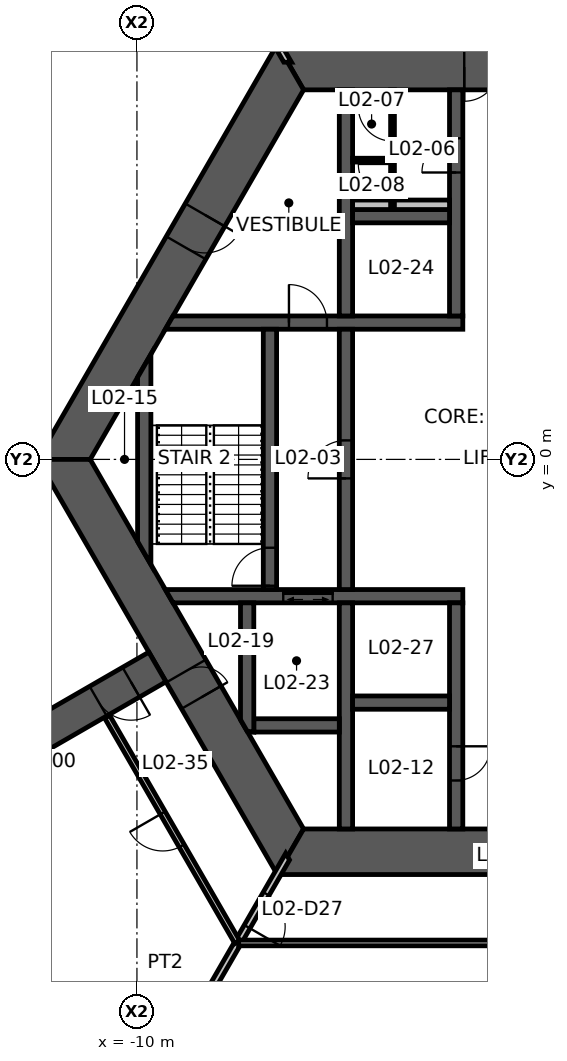
"""IFC4 building model, lengths in metres.
Left out: names, types, materials, properties, quantities, classifications, styles, units other than length and angle.
Written with IfcOpenShell. Run it as: python <this file> out.ifc"""

import sys

from ifc_helpers import new_model, si_unit, direction, frame, frame_2d, origin, place, context, subcontext, project, spatial, polyline, rectangle, outline, extrude, element, fill, save


model = new_model("IFC4")
c1 = context("Model", 3, precision=1e-05, world=origin(), true_north=direction((0.0, 1.0)))
c2 = subcontext(c1, "Body", "Model", "MODEL_VIEW")
j1 = project(units=[si_unit("LENGTHUNIT", "METRE"), si_unit("PLANEANGLEUNIT", "RADIAN")], contexts=[c1])
p1 = place(None, origin())
s1 = spatial("IfcSite", under=j1, at=p1, CompositionType="ELEMENT")
p2 = place(p1, origin())
s2 = spatial("IfcBuilding", under=s1, at=p2, CompositionType="ELEMENT")
p3 = place(p2, frame((0.0, 0.0, 5.5)))
s3 = spatial("IfcBuildingStorey", under=s2, at=p3, CompositionType="ELEMENT", Elevation=5.5)
p4 = place(p3, frame((5.961, 10.325, 0.0), z_axis=(0.0, 0.0, 1.0), x_axis=(-1.0, 0.0, 0.0)))
e1 = element("IfcWall", 1, at=p4, inside=s3, PredefinedType="SHEAR", context=c2, shape_type="SweptSolid", body=[
    extrude(outline(polyline([(-0.346, -0.6), (4.574, -0.6), (5.474, -0.6), (6.449, -0.6), (7.349, -0.6), (12.269, -0.6), (11.576, 0.6), (7.349, 0.6), (6.449, 0.6), (5.474, 0.6), (4.574, 0.6), (0.346, 0.6), (-0.346, -0.6)])), origin(), (0.0, 0.0, 1.0), 4.5),
])
p5 = place(p4, frame((6.449, 0.0, 0.0)))
e2 = element("IfcOpeningElement", 2, at=p5, cuts=e1, PredefinedType="OPENING", context=c2, shape_type="SweptSolid", body=[
    extrude(rectangle(XDim=0.9, YDim=2.1, at=frame_2d((0.45, 1.05))), frame((0.0, 0.61, 0.0), z_axis=(0.0, -1.0, 0.0), x_axis=(1.0, 0.0, 0.0)), (0.0, 0.0, 1.0), 1.22),
])
p6 = place(p4, frame((4.574, 0.0, 0.0)))
e3 = element("IfcOpeningElement", 3, at=p6, cuts=e1, PredefinedType="OPENING", context=c2, shape_type="SweptSolid", body=[
    extrude(rectangle(XDim=0.9, YDim=2.1, at=frame_2d((0.45, 1.05))), frame((0.0, 0.61, 0.0), z_axis=(0.0, -1.0, 0.0), x_axis=(1.0, 0.0, 0.0)), (0.0, 0.0, 1.0), 1.22),
])
p7 = place(p3, frame((-5.961, 10.325, 0.0), z_axis=(0.0, 0.0, 1.0), x_axis=(-0.500004296715, -0.866022923061, 0.0)))
e4 = element("IfcWall", 4, at=p7, inside=s3, PredefinedType="SHEAR", context=c2, shape_type="SweptSolid", body=[
    extrude(outline(polyline([(-0.346, -0.6), (4.494, -0.6), (5.494, -0.6), (12.269, -0.6), (11.576, 0.6), (5.494, 0.6), (4.494, 0.6), (0.346, 0.6), (-0.346, -0.6)])), origin(), (0.0, 0.0, 1.0), 4.5),
])
p8 = place(p7, frame((4.494, 0.0, 0.0)))
e5 = element("IfcOpeningElement", 5, at=p8, cuts=e4, PredefinedType="OPENING", context=c2, shape_type="SweptSolid", body=[
    extrude(rectangle(XDim=1.0, YDim=2.1, at=frame_2d((0.5, 1.05))), frame((0.0, 0.61, 0.0), z_axis=(0.0, -1.0, 0.0), x_axis=(1.0, 0.0, 0.0)), (0.0, 0.0, 1.0), 1.22),
])
p9 = place(p3, frame((-11.922, 0.0, 0.0), z_axis=(0.0, 0.0, 1.0), x_axis=(0.500004296715, -0.866022923061, 0.0)))
e6 = element("IfcWall", 6, at=p9, inside=s3, PredefinedType="SHEAR", context=c2, shape_type="SweptSolid", body=[
    extrude(outline(polyline([(-0.346, -0.6), (6.431, -0.6), (7.231, -0.6), (12.269, -0.6), (11.576, 0.6), (7.231, 0.6), (6.431, 0.6), (0.346, 0.6), (-0.346, -0.6)])), origin(), (0.0, 0.0, 1.0), 4.5),
])
p10 = place(p9, frame((6.431, 0.0, 0.0)))
e7 = element("IfcOpeningElement", 7, at=p10, cuts=e6, PredefinedType="OPENING", context=c2, shape_type="SweptSolid", body=[
    extrude(rectangle(XDim=0.8, YDim=2.1, at=frame_2d((0.4, 1.05))), frame((0.0, 0.61, 0.0), z_axis=(0.0, -1.0, 0.0), x_axis=(1.0, 0.0, 0.0)), (0.0, 0.0, 1.0), 1.22),
])
p11 = place(p3, frame((-5.961, -10.325, 0.0), z_axis=(0.0, 0.0, 1.0), x_axis=(1.0, 0.0, 0.0)))
e8 = element("IfcWall", 8, at=p11, inside=s3, PredefinedType="SHEAR", context=c2, shape_type="SweptSolid", body=[
    extrude(outline(polyline([(-0.346, -0.6), (5.461, -0.6), (6.461, -0.6), (12.269, -0.6), (11.576, 0.6), (6.461, 0.6), (5.461, 0.6), (0.346, 0.6), (-0.346, -0.6)])), origin(), (0.0, 0.0, 1.0), 4.5),
])
p12 = place(p11, frame((5.461, 0.0, 0.0)))
e9 = element("IfcOpeningElement", 9, at=p12, cuts=e8, PredefinedType="OPENING", context=c2, shape_type="SweptSolid", body=[
    extrude(rectangle(XDim=1.0, YDim=2.1, at=frame_2d((0.5, 1.05))), frame((0.0, 0.61, 0.0), z_axis=(0.0, -1.0, 0.0), x_axis=(1.0, 0.0, 0.0)), (0.0, 0.0, 1.0), 1.22),
])
p13 = place(p3, frame((-9.461, -5.462, 0.0), z_axis=(0.0, 0.0, 1.0), x_axis=(-0.866019116917, -0.500010889016, 0.0)))
e10 = element("IfcWall", 10, at=p13, inside=s3, PredefinedType="SHEAR", context=c2, shape_type="SweptSolid", body=[
    extrude(rectangle(XDim=7.595, YDim=0.9, at=frame_2d((3.798, 0.0))), origin(), (0.0, 0.0, 1.0), 4.5),
])
p14 = place(p13, frame((0.8, 0.0, 0.0)))
e11 = element("IfcOpeningElement", 11, at=p14, cuts=e10, PredefinedType="OPENING", context=c2, shape_type="SweptSolid", body=[
    extrude(rectangle(XDim=1.0, YDim=2.1, at=frame_2d((0.5, 1.05))), frame((0.0, 0.46, 0.0), z_axis=(0.0, -1.0, 0.0), x_axis=(1.0, 0.0, 0.0)), (0.0, 0.0, 1.0), 0.92),
])
p15 = place(p3, frame((-9.151, 3.6, 0.0), z_axis=(0.0, 0.0, 1.0), x_axis=(1.0, 0.0, 0.0)))
e12 = element("IfcWall", 12, at=p15, inside=s3, PredefinedType="SHEAR", context=c2, shape_type="SweptSolid", body=[
    extrude(outline(polyline([(-0.101, -0.175), (3.151, -0.175), (4.151, -0.175), (7.726, -0.175), (7.726, 0.175), (4.151, 0.175), (3.151, 0.175), (0.101, 0.175), (-0.101, -0.175)])), origin(), (0.0, 0.0, 1.0), 4.5),
])
p16 = place(p15, frame((3.151, 0.0, 0.0)))
e13 = element("IfcOpeningElement", 13, at=p16, cuts=e12, PredefinedType="OPENING", context=c2, shape_type="SweptSolid", body=[
    extrude(rectangle(XDim=1.0, YDim=2.1, at=frame_2d((0.5, 1.05))), frame((0.0, 0.185, 0.0), z_axis=(0.0, -1.0, 0.0), x_axis=(1.0, 0.0, 0.0)), (0.0, 0.0, 1.0), 0.37),
])
p17 = place(p3, frame((-9.151, -3.6, 0.0), z_axis=(0.0, 0.0, 1.0), x_axis=(1.0, 0.0, 0.0)))
e14 = element("IfcWall", 14, at=p17, inside=s3, PredefinedType="SHEAR", context=c2, shape_type="SweptSolid", body=[
    extrude(outline(polyline([(0.101, -0.175), (3.001, -0.175), (4.301, -0.175), (7.726, -0.175), (7.726, 0.175), (4.301, 0.175), (3.001, 0.175), (-0.101, 0.175), (0.101, -0.175)])), origin(), (0.0, 0.0, 1.0), 4.5),
])
p18 = place(p17, frame((3.001, 0.0, 0.0)))
e15 = element("IfcOpeningElement", 15, at=p18, cuts=e14, PredefinedType="OPENING", context=c2, shape_type="SweptSolid", body=[
    extrude(rectangle(XDim=1.3, YDim=2.1, at=frame_2d((0.65, 1.05))), frame((0.0, 0.185, 0.0), z_axis=(0.0, -1.0, 0.0), x_axis=(1.0, 0.0, 0.0)), (0.0, 0.0, 1.0), 0.37),
])
p19 = place(p3, frame((-1.6, 3.775, 0.0), z_axis=(0.0, 0.0, 1.0), x_axis=(0.0, 1.0, 0.0)))
e16 = element("IfcWall", 16, at=p19, inside=s3, PredefinedType="SHEAR", context=c2, shape_type="SweptSolid", body=[
    extrude(rectangle(XDim=5.95, YDim=0.35, at=frame_2d((2.975, 0.0))), origin(), (0.0, 0.0, 1.0), 4.5),
])
p20 = place(p19, frame((3.775, 0.0, 0.0)))
e17 = element("IfcOpeningElement", 17, at=p20, cuts=e16, PredefinedType="OPENING", context=c2, shape_type="SweptSolid", body=[
    extrude(rectangle(XDim=0.9, YDim=2.1, at=frame_2d((0.45, 1.05))), frame((0.0, 0.185, 0.0), z_axis=(0.0, -1.0, 0.0), x_axis=(1.0, 0.0, 0.0)), (0.0, 0.0, 1.0), 0.37),
])
p21 = place(p3, frame((-1.6, -3.775, 0.0), z_axis=(0.0, 0.0, 1.0), x_axis=(0.0, -1.0, 0.0)))
e18 = element("IfcWall", 18, at=p21, inside=s3, PredefinedType="SHEAR", context=c2, shape_type="SweptSolid", body=[
    extrude(rectangle(XDim=5.95, YDim=0.35, at=frame_2d((2.975, 0.0))), origin(), (0.0, 0.0, 1.0), 4.5),
])
p22 = place(p21, frame((3.775, 0.0, 0.0)))
e19 = element("IfcOpeningElement", 19, at=p22, cuts=e18, PredefinedType="OPENING", context=c2, shape_type="SweptSolid", body=[
    extrude(rectangle(XDim=0.9, YDim=2.1, at=frame_2d((0.45, 1.05))), frame((0.0, 0.185, 0.0), z_axis=(0.0, -1.0, 0.0), x_axis=(1.0, 0.0, 0.0)), (0.0, 0.0, 1.0), 0.37),
])
p23 = place(p3, frame((-4.5, -3.425, 0.0), z_axis=(0.0, 0.0, 1.0), x_axis=(0.0, 1.0, 0.0)))
e20 = element("IfcWall", 20, at=p23, inside=s3, PredefinedType="SHEAR", context=c2, shape_type="SweptSolid", body=[
    extrude(rectangle(XDim=6.85, YDim=0.35, at=frame_2d((3.425, 0.0))), origin(), (0.0, 0.0, 1.0), 4.5),
])
p24 = place(p23, frame((2.925, 0.0, 0.0)))
e21 = element("IfcOpeningElement", 21, at=p24, cuts=e20, PredefinedType="OPENING", context=c2, shape_type="SweptSolid", body=[
    extrude(rectangle(XDim=1.0, YDim=2.1, at=frame_2d((0.5, 1.05))), frame((0.0, 0.185, 0.0), z_axis=(0.0, -1.0, 0.0), x_axis=(1.0, 0.0, 0.0)), (0.0, 0.0, 1.0), 0.37),
])
p25 = place(p3, frame((-6.5, -3.425, 0.0), z_axis=(0.0, 0.0, 1.0), x_axis=(0.0, 1.0, 0.0)))
e22 = element("IfcWall", 22, at=p25, inside=s3, PredefinedType="SHEAR", context=c2, shape_type="SweptSolid", body=[
    extrude(rectangle(XDim=6.85, YDim=0.35, at=frame_2d((3.425, 0.0))), origin(), (0.0, 0.0, 1.0), 4.5),
])
p26 = place(p25, frame((0.1, 0.0, 0.0)))
e23 = element("IfcOpeningElement", 23, at=p26, cuts=e22, PredefinedType="OPENING", context=c2, shape_type="SweptSolid", body=[
    extrude(rectangle(XDim=1.0, YDim=2.1, at=frame_2d((0.5, 1.05))), frame((0.0, 0.185, 0.0), z_axis=(0.0, -1.0, 0.0), x_axis=(1.0, 0.0, 0.0)), (0.0, 0.0, 1.0), 0.37),
])
for number, where, z_axis, x_axis in (
    (24, (-4.5, 3.775, 0.0), (0.0, 0.0, 1.0), (0.0, 1.0, 0.0)),
    (25, (-4.5, -3.775, 0.0), (0.0, 0.0, 1.0), (0.0, -1.0, 0.0)),
):
    element("IfcWall", number, at=place(p3, frame(where, z_axis=z_axis, x_axis=x_axis)), inside=s3, PredefinedType="SHEAR", context=c2, shape_type="SweptSolid", body=[
        extrude(rectangle(XDim=5.95, YDim=0.35, at=frame_2d((2.975, 0.0))), origin(), (0.0, 0.0, 1.0), 4.5),
    ])
for number, where, z_axis, x_axis in (
    (26, (-4.325, 6.4, 0.0), (0.0, 0.0, 1.0), (1.0, 0.0, 0.0)),
    (27, (-4.325, -6.4, 0.0), (0.0, 0.0, 1.0), (1.0, 0.0, 0.0)),
):
    element("IfcWall", number, at=place(p3, frame(where, z_axis=z_axis, x_axis=x_axis)), inside=s3, PredefinedType="SHEAR", context=c2, shape_type="SweptSolid", body=[
        extrude(rectangle(XDim=2.55, YDim=0.35, at=frame_2d((1.275, 0.0))), origin(), (0.0, 0.0, 1.0), 4.5),
    ])
p27 = place(p3, frame((-6.925, -7.0, 0.0), z_axis=(0.0, 0.0, 1.0), x_axis=(1.0, 0.0, 0.0)))
e28 = element("IfcWall", 28, at=p27, inside=s3, PredefinedType="SHEAR", context=c2, shape_type="SweptSolid", body=[
    extrude(rectangle(XDim=2.25, YDim=0.35, at=frame_2d((1.125, 0.0))), origin(), (0.0, 0.0, 1.0), 4.5),
])
p28 = place(p3, frame((-7.1, -3.775, 0.0), z_axis=(0.0, 0.0, 1.0), x_axis=(0.0, -1.0, 0.0)))
e29 = element("IfcWall", 29, at=p28, inside=s3, PredefinedType="SHEAR", context=c2, shape_type="SweptSolid", body=[
    extrude(outline(polyline([(0.0, -0.175), (3.074, -0.175), (3.377, 0.0), (3.4, 0.175), (0.0, 0.175), (0.0, -0.175)])), origin(), (0.0, 0.0, 1.0), 4.5),
])
p29 = place(p3, frame((-9.808, -2.462, 0.0), z_axis=(0.0, 0.0, 1.0), x_axis=(0.0, 1.0, 0.0)))
e30 = element("IfcWall", 30, at=p29, inside=s3, PredefinedType="SHEAR", context=c2, shape_type="SweptSolid", body=[
    extrude(outline(polyline([(-0.303, -0.175), (5.228, -0.175), (4.621, 0.175), (0.303, 0.175), (-0.303, -0.175)])), origin(), (0.0, 0.0, 1.0), 4.5),
])
p30 = place(p3, frame((-4.325, 6.7, 0.0), z_axis=(0.0, 0.0, 1.0), x_axis=(1.0, 0.0, 0.0)))
e31 = element("IfcWall", 31, at=p30, inside=s3, PredefinedType="PLUMBINGWALL", context=c2, shape_type="SweptSolid", body=[
    extrude(rectangle(XDim=2.55, YDim=0.25, at=frame_2d((1.275, 0.0))), origin(), (0.0, 0.0, 1.0), 4.5),
])
p31 = place(p3, frame((-3.275, 6.575, 0.0), z_axis=(0.0, 0.0, 1.0), x_axis=(0.0, 1.0, 0.0)))
e32 = element("IfcWall", 32, at=p31, inside=s3, PredefinedType="PARTITIONING", context=c2, shape_type="SweptSolid", body=[
    extrude(rectangle(XDim=3.15, YDim=0.1, at=frame_2d((1.575, 0.0))), origin(), (0.0, 0.0, 1.0), 3.5),
])
p32 = place(p31, frame((1.8, 0.0, 0.0)))
e33 = element("IfcOpeningElement", 33, at=p32, cuts=e32, PredefinedType="OPENING", context=c2, shape_type="SweptSolid", body=[
    extrude(rectangle(XDim=0.9, YDim=2.1, at=frame_2d((0.45, 1.05))), frame((0.0, 0.06, 0.0), z_axis=(0.0, -1.0, 0.0), x_axis=(1.0, 0.0, 0.0)), (0.0, 0.0, 1.0), 0.12),
])
p33 = place(p31, frame((0.3, 0.0, 0.0)))
e34 = element("IfcOpeningElement", 34, at=p33, cuts=e32, PredefinedType="OPENING", context=c2, shape_type="SweptSolid", body=[
    extrude(rectangle(XDim=0.9, YDim=2.1, at=frame_2d((0.45, 1.05))), frame((0.0, 0.06, 0.0), z_axis=(0.0, -1.0, 0.0), x_axis=(1.0, 0.0, 0.0)), (0.0, 0.0, 1.0), 0.12),
])
p34 = place(p3, frame((-3.325, 7.875, 0.0), z_axis=(0.0, 0.0, 1.0), x_axis=(-1.0, 0.0, 0.0)))
e35 = element("IfcWall", 35, at=p34, inside=s3, PredefinedType="PARTITIONING", context=c2, shape_type="SweptSolid", body=[
    extrude(rectangle(XDim=1.0, YDim=0.1, at=frame_2d((0.5, 0.0))), origin(), (0.0, 0.0, 1.0), 3.5),
])
p35 = place(p3, frame((-6.035, 10.453, 0.0), z_axis=(0.0, 0.0, 1.0), x_axis=(-0.499993402427, 0.866029212861, 0.0)))
e36 = element("IfcWall", 36, at=p35, inside=s3, PredefinedType="PARTITIONING", context=c2, shape_type="SweptSolid", body=[
    extrude(outline(polyline([(-0.051, -0.087), (1.129, -0.087), (2.129, -0.087), (7.93, -0.087), (7.93, 0.087), (2.129, 0.087), (1.129, 0.087), (0.051, 0.087), (-0.051, -0.087)])), origin(), (0.0, 0.0, 1.0), 3.6),
])
p36 = place(p35, frame((1.129, 0.0, 0.0)))
e37 = element("IfcOpeningElement", 37, at=p36, cuts=e36, PredefinedType="OPENING", context=c2, shape_type="SweptSolid", body=[
    extrude(rectangle(XDim=1.0, YDim=2.1, at=frame_2d((0.5, 1.05))), frame((0.0, 0.098, 0.0), z_axis=(0.0, -1.0, 0.0), x_axis=(1.0, 0.0, 0.0)), (0.0, 0.0, 1.0), 0.195),
])
p37 = place(p3, frame((-6.035, -10.453, 0.0), z_axis=(0.0, 0.0, 1.0), x_axis=(-0.499993402427, -0.866029212861, 0.0)))
e38 = element("IfcWall", 38, at=p37, inside=s3, PredefinedType="PARTITIONING", context=c2, shape_type="SweptSolid", body=[
    extrude(outline(polyline([(-0.051, -0.087), (1.129, -0.087), (2.129, -0.087), (7.93, -0.087), (7.93, 0.087), (2.129, 0.087), (1.129, 0.087), (0.051, 0.087), (-0.051, -0.087)])), origin(), (0.0, 0.0, 1.0), 3.6),
])
p38 = place(p37, frame((1.129, 0.0, 0.0)))
e39 = element("IfcOpeningElement", 39, at=p38, cuts=e38, PredefinedType="OPENING", context=c2, shape_type="SweptSolid", body=[
    extrude(rectangle(XDim=1.0, YDim=2.1, at=frame_2d((0.5, 1.05))), frame((0.0, 0.098, 0.0), z_axis=(0.0, -1.0, 0.0), x_axis=(1.0, 0.0, 0.0)), (0.0, 0.0, 1.0), 0.195),
])
p39 = place(p3, frame((-7.358, -12.705, 0.0), z_axis=(0.0, 0.0, 1.0), x_axis=(-0.499985579985, 0.866033729024, 0.0)))
e40 = element("IfcWall", 40, at=p39, inside=s3, PredefinedType="PARTITIONING", context=c2, shape_type="SweptSolid", body=[
    extrude(rectangle(XDim=6.854, YDim=0.15, at=frame_2d((3.427, 0.0))), origin(), (0.0, 0.0, 1.0), 3.5),
])
p40 = place(p39, frame((2.927, 0.0, 0.0)))
e41 = element("IfcOpeningElement", 41, at=p40, cuts=e40, PredefinedType="OPENING", context=c2, shape_type="SweptSolid", body=[
    extrude(rectangle(XDim=1.0, YDim=2.1, at=frame_2d((0.5, 1.05))), frame((0.0, 0.085, 0.0), z_axis=(0.0, -1.0, 0.0), x_axis=(1.0, 0.0, 0.0)), (0.0, 0.0, 1.0), 0.17),
])
p41 = place(p3, frame((7.347, -12.725, 0.0), z_axis=(0.0, 0.0, 1.0), x_axis=(-1.0, 0.0, 0.0)))
e42 = element("IfcWall", 42, at=p41, inside=s3, PredefinedType="PARTITIONING", context=c2, shape_type="SweptSolid", body=[
    extrude(rectangle(XDim=14.67, YDim=0.15, at=frame_2d((7.335, 0.0))), origin(), (0.0, 0.0, 1.0), 3.5),
])
p42 = place(p41, frame((6.835, 0.0, 0.0)))
e43 = element("IfcOpeningElement", 43, at=p42, cuts=e42, PredefinedType="OPENING", context=c2, shape_type="SweptSolid", body=[
    extrude(rectangle(XDim=1.0, YDim=2.1, at=frame_2d((0.5, 1.05))), frame((0.0, 0.085, 0.0), z_axis=(0.0, -1.0, 0.0), x_axis=(1.0, 0.0, 0.0)), (0.0, 0.0, 1.0), 0.17),
])
p43 = place(p5, origin())
e44 = element("IfcDoor", 44, at=p43, inside=s3, OperationType="SINGLE_SWING_RIGHT", PredefinedType="DOOR", context=c2, shape_type="SweptSolid", body=[
    extrude(rectangle(XDim=0.9, YDim=2.1, at=frame_2d((0.45, 1.05))), frame((0.0, 0.025, 0.0), z_axis=(0.0, -1.0, 0.0), x_axis=(1.0, 0.0, 0.0)), (0.0, 0.0, 1.0), 0.05),
])
fill(e2, e44)
p44 = place(p10, origin())
e45 = element("IfcDoor", 45, at=p44, inside=s3, OperationType="SINGLE_SWING_RIGHT", PredefinedType="DOOR", context=c2, shape_type="SweptSolid", body=[
    extrude(rectangle(XDim=0.8, YDim=2.1, at=frame_2d((0.4, 1.05))), frame((0.0, 0.025, 0.0), z_axis=(0.0, -1.0, 0.0), x_axis=(1.0, 0.0, 0.0)), (0.0, 0.0, 1.0), 0.05),
])
fill(e7, e45)
p45 = place(p8, origin())
e46 = element("IfcDoor", 46, at=p45, inside=s3, OperationType="SINGLE_SWING_LEFT", PredefinedType="DOOR", context=c2, shape_type="SweptSolid", body=[
    extrude(rectangle(XDim=1.0, YDim=2.1, at=frame_2d((0.5, 1.05))), frame((0.0, 0.025, 0.0), z_axis=(0.0, -1.0, 0.0), x_axis=(1.0, 0.0, 0.0)), (0.0, 0.0, 1.0), 0.05),
])
fill(e5, e46)
p46 = place(p24, origin())
e47 = element("IfcDoor", 47, at=p46, inside=s3, OperationType="SINGLE_SWING_LEFT", PredefinedType="DOOR", context=c2, shape_type="SweptSolid", body=[
    extrude(rectangle(XDim=1.0, YDim=2.1, at=frame_2d((0.5, 1.05))), frame((0.0, 0.025, 0.0), z_axis=(0.0, -1.0, 0.0), x_axis=(1.0, 0.0, 0.0)), (0.0, 0.0, 1.0), 0.05),
])
fill(e21, e47)
p47 = place(p26, origin())
e48 = element("IfcDoor", 48, at=p47, inside=s3, OperationType="SINGLE_SWING_LEFT", PredefinedType="DOOR", context=c2, shape_type="SweptSolid", body=[
    extrude(rectangle(XDim=1.0, YDim=2.1, at=frame_2d((0.5, 1.05))), frame((0.0, 0.025, 0.0), z_axis=(0.0, -1.0, 0.0), x_axis=(1.0, 0.0, 0.0)), (0.0, 0.0, 1.0), 0.05),
])
fill(e23, e48)
p48 = place(p16, origin())
e49 = element("IfcDoor", 49, at=p48, inside=s3, OperationType="SINGLE_SWING_LEFT", PredefinedType="DOOR", context=c2, shape_type="SweptSolid", body=[
    extrude(rectangle(XDim=1.0, YDim=2.1, at=frame_2d((0.5, 1.05))), frame((0.0, 0.025, 0.0), z_axis=(0.0, -1.0, 0.0), x_axis=(1.0, 0.0, 0.0)), (0.0, 0.0, 1.0), 0.05),
])
fill(e13, e49)
p49 = place(p20, origin())
e50 = element("IfcDoor", 50, at=p49, inside=s3, OperationType="SINGLE_SWING_LEFT", PredefinedType="DOOR", context=c2, shape_type="SweptSolid", body=[
    extrude(rectangle(XDim=0.9, YDim=2.1, at=frame_2d((0.45, 1.05))), frame((0.0, 0.025, 0.0), z_axis=(0.0, -1.0, 0.0), x_axis=(1.0, 0.0, 0.0)), (0.0, 0.0, 1.0), 0.05),
])
fill(e17, e50)
p50 = place(p22, origin())
e51 = element("IfcDoor", 51, at=p50, inside=s3, OperationType="SINGLE_SWING_LEFT", PredefinedType="DOOR", context=c2, shape_type="SweptSolid", body=[
    extrude(rectangle(XDim=0.9, YDim=2.1, at=frame_2d((0.45, 1.05))), frame((0.0, 0.025, 0.0), z_axis=(0.0, -1.0, 0.0), x_axis=(1.0, 0.0, 0.0)), (0.0, 0.0, 1.0), 0.05),
])
fill(e19, e51)
p51 = place(p14, origin())
e52 = element("IfcDoor", 52, at=p51, inside=s3, OperationType="SINGLE_SWING_LEFT", PredefinedType="DOOR", context=c2, shape_type="SweptSolid", body=[
    extrude(rectangle(XDim=1.0, YDim=2.1, at=frame_2d((0.5, 1.05))), frame((0.0, 0.025, 0.0), z_axis=(0.0, -1.0, 0.0), x_axis=(1.0, 0.0, 0.0)), (0.0, 0.0, 1.0), 0.05),
])
fill(e11, e52)
p52 = place(p32, origin())
e53 = element("IfcDoor", 53, at=p52, inside=s3, OperationType="SINGLE_SWING_RIGHT", PredefinedType="DOOR", context=c2, shape_type="SweptSolid", body=[
    extrude(rectangle(XDim=0.9, YDim=2.1, at=frame_2d((0.45, 1.05))), frame((0.0, 0.025, 0.0), z_axis=(0.0, -1.0, 0.0), x_axis=(1.0, 0.0, 0.0)), (0.0, 0.0, 1.0), 0.05),
])
fill(e33, e53)
p53 = place(p33, origin())
e54 = element("IfcDoor", 54, at=p53, inside=s3, OperationType="SINGLE_SWING_RIGHT", PredefinedType="DOOR", context=c2, shape_type="SweptSolid", body=[
    extrude(rectangle(XDim=0.9, YDim=2.1, at=frame_2d((0.45, 1.05))), frame((0.0, 0.025, 0.0), z_axis=(0.0, -1.0, 0.0), x_axis=(1.0, 0.0, 0.0)), (0.0, 0.0, 1.0), 0.05),
])
fill(e34, e54)
p54 = place(p38, origin())
e55 = element("IfcDoor", 55, at=p54, inside=s3, OperationType="SINGLE_SWING_RIGHT", PredefinedType="DOOR", context=c2, shape_type="SweptSolid", body=[
    extrude(rectangle(XDim=1.0, YDim=2.1, at=frame_2d((0.5, 1.05))), frame((0.0, 0.025, 0.0), z_axis=(0.0, -1.0, 0.0), x_axis=(1.0, 0.0, 0.0)), (0.0, 0.0, 1.0), 0.05),
])
fill(e39, e55)
p55 = place(p40, origin())
e56 = element("IfcDoor", 56, at=p55, inside=s3, OperationType="SINGLE_SWING_RIGHT", PredefinedType="DOOR", context=c2, shape_type="SweptSolid", body=[
    extrude(rectangle(XDim=1.0, YDim=2.1, at=frame_2d((0.5, 1.05))), frame((0.0, 0.025, 0.0), z_axis=(0.0, -1.0, 0.0), x_axis=(1.0, 0.0, 0.0)), (0.0, 0.0, 1.0), 0.05),
])
fill(e41, e56)
p56 = place(p18, origin())
e57 = element("IfcDoor", 57, at=p56, inside=s3, OperationType="DOUBLE_DOOR_SLIDING", PredefinedType="DOOR", context=c2, shape_type="SweptSolid", body=[
    extrude(rectangle(XDim=1.3, YDim=2.1, at=frame_2d((0.65, 1.05))), frame((0.0, 0.025, 0.0), z_axis=(0.0, -1.0, 0.0), x_axis=(1.0, 0.0, 0.0)), (0.0, 0.0, 1.0), 0.05),
])
fill(e15, e57)
save(model, sys.argv[1])
